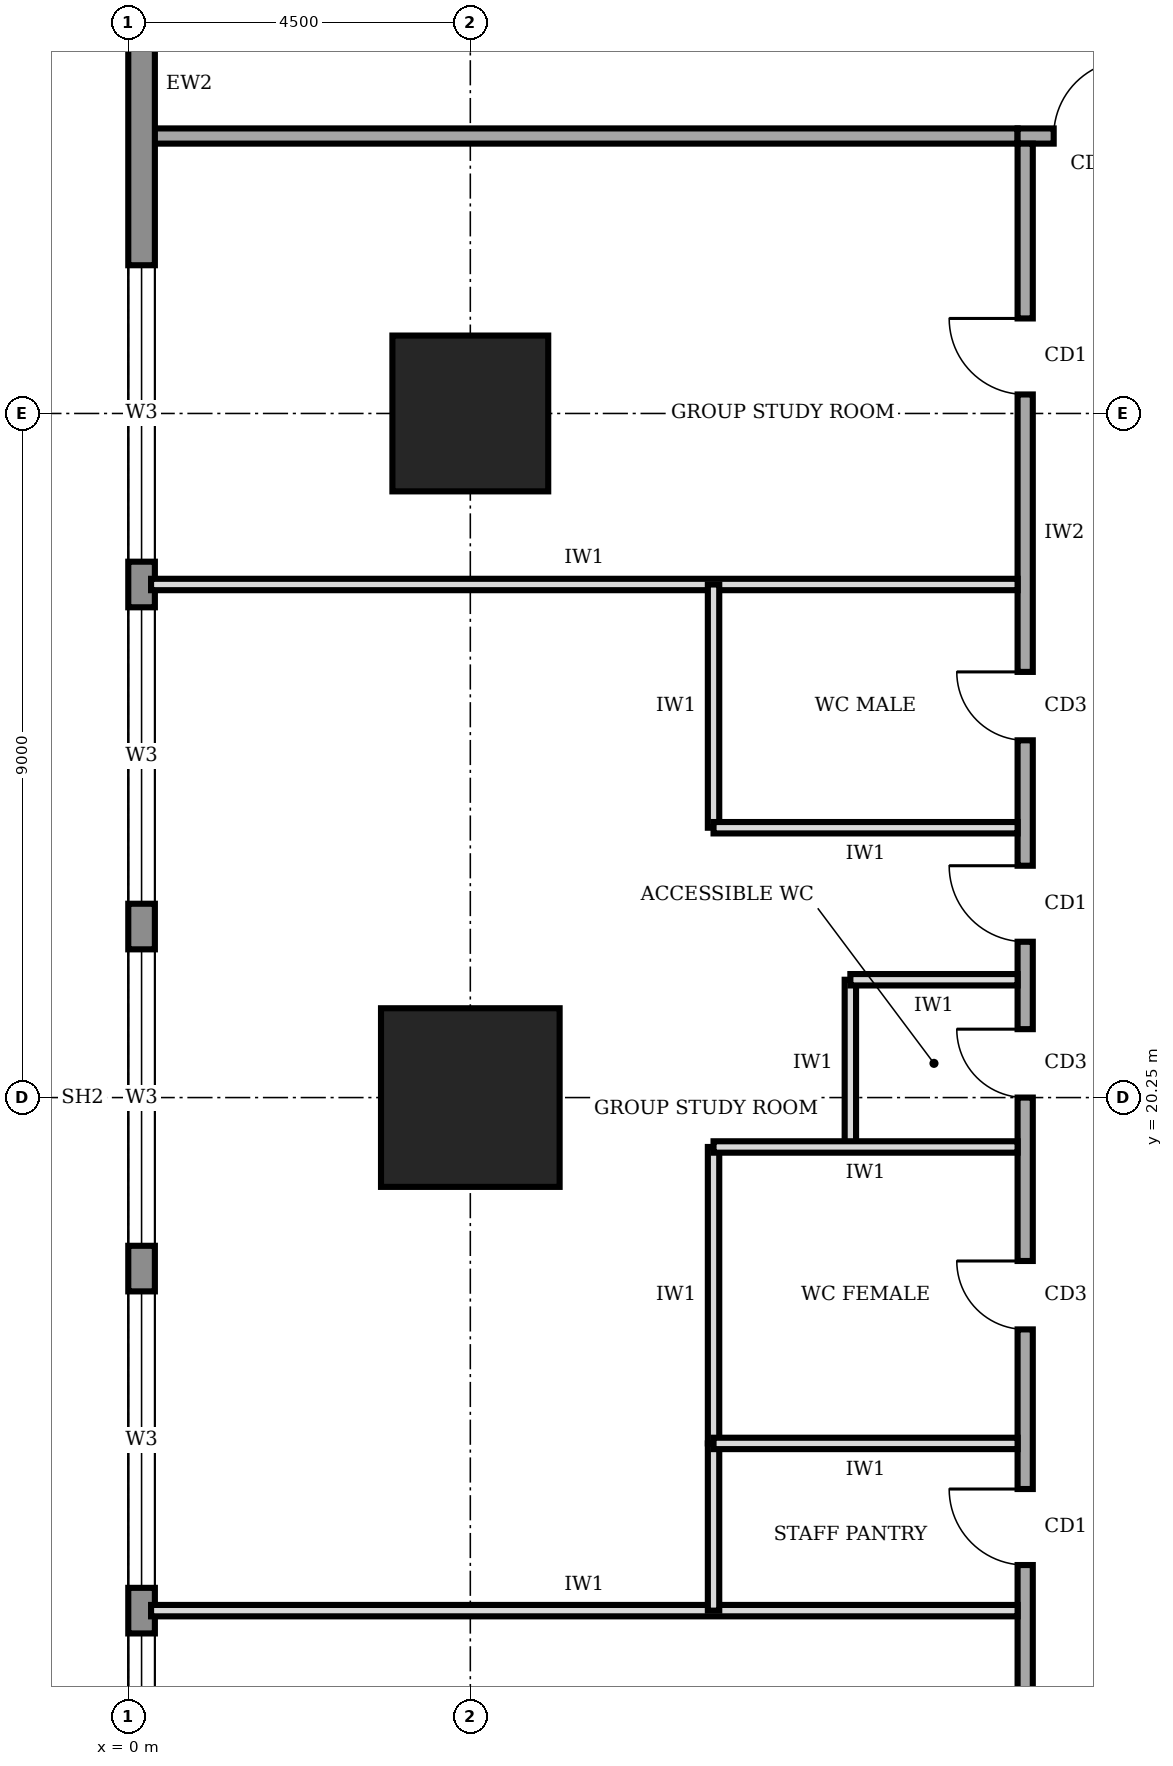
"""IFC4 building model, lengths in metres.
Left out: names, types, materials, properties, quantities, classifications, styles, units other than length and angle.
Written with IfcOpenShell. Run it as: python <this file> out.ifc"""

import sys

from ifc_helpers import new_model, si_unit, direction, frame, frame_2d, origin, origin_2d, place, context, subcontext, project, spatial, rectangle, extrude, element, fill, save


model = new_model("IFC4")
c1 = context("Model", 3, precision=1e-05, world=origin(), true_north=direction((0.0, 1.0)))
c2 = subcontext(c1, "Body", "Model", "MODEL_VIEW")
j1 = project(units=[si_unit("LENGTHUNIT", "METRE"), si_unit("PLANEANGLEUNIT", "RADIAN")], contexts=[c1])
p1 = place(None, origin())
s1 = spatial("IfcSite", under=j1, at=p1, CompositionType="ELEMENT")
p2 = place(p1, origin())
s2 = spatial("IfcBuilding", under=s1, at=p2, CompositionType="ELEMENT")
p3 = place(p2, frame((0.0, 0.0, 197.0)))
s3 = spatial("IfcBuildingStorey", under=s2, at=p3, CompositionType="ELEMENT", Elevation=197.0)
p4 = place(p3, frame((4.5, 20.25, 0.0), z_axis=(0.0, 0.0, 1.0), x_axis=(1.0, 0.0, 0.0)))
e1 = element("IfcColumn", 1, at=p4, inside=s3, PredefinedType="COLUMN", context=c2, shape_type="SweptSolid", body=[
    extrude(rectangle(XDim=2.35, YDim=2.35, at=origin_2d()), origin(), (0.0, 0.0, 1.0), 4.0),
])
p5 = place(p3, frame((4.5, 29.25, 0.0), z_axis=(0.0, 0.0, 1.0), x_axis=(1.0, 0.0, 0.0)))
e2 = element("IfcColumn", 2, at=p5, inside=s3, PredefinedType="COLUMN", context=c2, shape_type="SweptSolid", body=[
    extrude(rectangle(XDim=2.05, YDim=2.05, at=origin_2d()), origin(), (0.0, 0.0, 1.0), 4.0),
])
p6 = place(p3, frame((0.175, 35.98, 0.0), z_axis=(0.0, 0.0, 1.0), x_axis=(0.0, -1.0, 0.0)))
e3 = element("IfcWall", 3, at=p6, inside=s3, PredefinedType="STANDARD", context=c2, shape_type="SweptSolid", body=[
    extrude(rectangle(XDim=31.46, YDim=0.35, at=frame_2d((15.73, 0.0))), origin(), (0.0, 0.0, 1.0), 3.75),
])
p7 = place(p6, frame((27.21, 0.0, 0.95)))
e4 = element("IfcOpeningElement", 4, at=p7, cuts=e3, PredefinedType="OPENING", context=c2, shape_type="SweptSolid", body=[
    extrude(rectangle(XDim=3.9, YDim=1.8, at=frame_2d((1.95, 0.9))), frame((0.0, 0.185, 0.0), z_axis=(0.0, -1.0, 0.0), x_axis=(1.0, 0.0, 0.0)), (0.0, 0.0, 1.0), 0.37),
])
p8 = place(p6, frame((22.78, 0.0, 0.95)))
e5 = element("IfcOpeningElement", 5, at=p8, cuts=e3, PredefinedType="OPENING", context=c2, shape_type="SweptSolid", body=[
    extrude(rectangle(XDim=3.9, YDim=1.8, at=frame_2d((1.95, 0.9))), frame((0.0, 0.185, 0.0), z_axis=(0.0, -1.0, 0.0), x_axis=(1.0, 0.0, 0.0)), (0.0, 0.0, 1.0), 0.37),
])
p9 = place(p6, frame((18.28, 0.0, 0.95)))
e6 = element("IfcOpeningElement", 6, at=p9, cuts=e3, PredefinedType="OPENING", context=c2, shape_type="SweptSolid", body=[
    extrude(rectangle(XDim=3.9, YDim=1.8, at=frame_2d((1.95, 0.9))), frame((0.0, 0.185, 0.0), z_axis=(0.0, -1.0, 0.0), x_axis=(1.0, 0.0, 0.0)), (0.0, 0.0, 1.0), 0.37),
])
p10 = place(p6, frame((13.78, 0.0, 0.95)))
e7 = element("IfcOpeningElement", 7, at=p10, cuts=e3, PredefinedType="OPENING", context=c2, shape_type="SweptSolid", body=[
    extrude(rectangle(XDim=3.9, YDim=1.8, at=frame_2d((1.95, 0.9))), frame((0.0, 0.185, 0.0), z_axis=(0.0, -1.0, 0.0), x_axis=(1.0, 0.0, 0.0)), (0.0, 0.0, 1.0), 0.37),
])
p11 = place(p6, frame((9.28, 0.0, 0.95)))
e8 = element("IfcOpeningElement", 8, at=p11, cuts=e3, PredefinedType="OPENING", context=c2, shape_type="SweptSolid", body=[
    extrude(rectangle(XDim=3.9, YDim=1.8, at=frame_2d((1.95, 0.9))), frame((0.0, 0.185, 0.0), z_axis=(0.0, -1.0, 0.0), x_axis=(1.0, 0.0, 0.0)), (0.0, 0.0, 1.0), 0.37),
])
p12 = place(p6, frame((4.78, 0.0, 0.95)))
e9 = element("IfcOpeningElement", 9, at=p12, cuts=e3, PredefinedType="OPENING", context=c2, shape_type="SweptSolid", body=[
    extrude(rectangle(XDim=3.9, YDim=1.8, at=frame_2d((1.95, 0.9))), frame((0.0, 0.185, 0.0), z_axis=(0.0, -1.0, 0.0), x_axis=(1.0, 0.0, 0.0)), (0.0, 0.0, 1.0), 0.37),
])
p13 = place(p3, frame((28.6, 32.9, 0.0), z_axis=(0.0, 0.0, 1.0), x_axis=(-1.0, 0.0, 0.0)))
e10 = element("IfcWall", 10, at=p13, inside=s3, PredefinedType="SOLIDWALL", context=c2, shape_type="SweptSolid", body=[
    extrude(rectangle(XDim=16.9, YDim=0.2, at=frame_2d((8.45, 0.0))), origin(), (0.0, 0.0, 1.0), 3.75),
])
p14 = place(p13, frame((15.425, 0.0, 0.0)))
e11 = element("IfcOpeningElement", 11, at=p14, cuts=e10, PredefinedType="OPENING", context=c2, shape_type="SweptSolid", body=[
    extrude(rectangle(XDim=1.0, YDim=2.1, at=frame_2d((0.5, 1.05))), frame((0.0, 0.11, 0.0), z_axis=(0.0, -1.0, 0.0), x_axis=(1.0, 0.0, 0.0)), (0.0, 0.0, 1.0), 0.22),
])
p15 = place(p13, frame((12.35, 0.0, 0.0)))
e12 = element("IfcOpeningElement", 12, at=p15, cuts=e10, PredefinedType="OPENING", context=c2, shape_type="SweptSolid", body=[
    extrude(rectangle(XDim=1.0, YDim=2.1, at=frame_2d((0.5, 1.05))), frame((0.0, 0.11, 0.0), z_axis=(0.0, -1.0, 0.0), x_axis=(1.0, 0.0, 0.0)), (0.0, 0.0, 1.0), 0.22),
])
p16 = place(p13, frame((5.6, 0.0, 0.0)))
e13 = element("IfcOpeningElement", 13, at=p16, cuts=e10, PredefinedType="OPENING", context=c2, shape_type="SweptSolid", body=[
    extrude(rectangle(XDim=1.0, YDim=2.1, at=frame_2d((0.5, 1.05))), frame((0.0, 0.11, 0.0), z_axis=(0.0, -1.0, 0.0), x_axis=(1.0, 0.0, 0.0)), (0.0, 0.0, 1.0), 0.22),
])
p17 = place(p13, frame((0.275, 0.0, 0.0)))
e14 = element("IfcOpeningElement", 14, at=p17, cuts=e10, PredefinedType="OPENING", context=c2, shape_type="SweptSolid", body=[
    extrude(rectangle(XDim=1.0, YDim=2.1, at=frame_2d((0.5, 1.05))), frame((0.0, 0.11, 0.0), z_axis=(0.0, -1.0, 0.0), x_axis=(1.0, 0.0, 0.0)), (0.0, 0.0, 1.0), 0.22),
])
p18 = place(p3, frame((11.8, 32.8, 0.0), z_axis=(0.0, 0.0, 1.0), x_axis=(0.0, -1.0, 0.0)))
e15 = element("IfcWall", 15, at=p18, inside=s3, PredefinedType="SOLIDWALL", context=c2, shape_type="SweptSolid", body=[
    extrude(rectangle(XDim=25.3, YDim=0.2, at=frame_2d((12.65, 0.0))), origin(), (0.0, 0.0, 1.0), 3.75),
])
p19 = place(p18, frame((21.8, 0.0, 0.0)))
e16 = element("IfcOpeningElement", 16, at=p19, cuts=e15, PredefinedType="OPENING", context=c2, shape_type="SweptSolid", body=[
    extrude(rectangle(XDim=1.0, YDim=2.1, at=frame_2d((0.5, 1.05))), frame((0.0, 0.11, 0.0), z_axis=(0.0, -1.0, 0.0), x_axis=(1.0, 0.0, 0.0)), (0.0, 0.0, 1.0), 0.22),
])
p20 = place(p18, frame((17.7, 0.0, 0.0)))
e17 = element("IfcOpeningElement", 17, at=p20, cuts=e15, PredefinedType="OPENING", context=c2, shape_type="SweptSolid", body=[
    extrude(rectangle(XDim=1.0, YDim=2.1, at=frame_2d((0.5, 1.05))), frame((0.0, 0.11, 0.0), z_axis=(0.0, -1.0, 0.0), x_axis=(1.0, 0.0, 0.0)), (0.0, 0.0, 1.0), 0.22),
])
p21 = place(p18, frame((14.7, 0.0, 0.0)))
e18 = element("IfcOpeningElement", 18, at=p21, cuts=e15, PredefinedType="OPENING", context=c2, shape_type="SweptSolid", body=[
    extrude(rectangle(XDim=0.9, YDim=2.1, at=frame_2d((0.45, 1.05))), frame((0.0, 0.11, 0.0), z_axis=(0.0, -1.0, 0.0), x_axis=(1.0, 0.0, 0.0)), (0.0, 0.0, 1.0), 0.22),
])
p22 = place(p18, frame((11.65, 0.0, 0.0)))
e19 = element("IfcOpeningElement", 19, at=p22, cuts=e15, PredefinedType="OPENING", context=c2, shape_type="SweptSolid", body=[
    extrude(rectangle(XDim=0.9, YDim=2.1, at=frame_2d((0.45, 1.05))), frame((0.0, 0.11, 0.0), z_axis=(0.0, -1.0, 0.0), x_axis=(1.0, 0.0, 0.0)), (0.0, 0.0, 1.0), 0.22),
])
p23 = place(p18, frame((6.95, 0.0, 0.0)))
e20 = element("IfcOpeningElement", 20, at=p23, cuts=e15, PredefinedType="OPENING", context=c2, shape_type="SweptSolid", body=[
    extrude(rectangle(XDim=0.9, YDim=2.1, at=frame_2d((0.45, 1.05))), frame((0.0, 0.11, 0.0), z_axis=(0.0, -1.0, 0.0), x_axis=(1.0, 0.0, 0.0)), (0.0, 0.0, 1.0), 0.22),
])
p24 = place(p18, frame((9.5, 0.0, 0.0)))
e21 = element("IfcOpeningElement", 21, at=p24, cuts=e15, PredefinedType="OPENING", context=c2, shape_type="SweptSolid", body=[
    extrude(rectangle(XDim=1.0, YDim=2.1, at=frame_2d((0.5, 1.05))), frame((0.0, 0.11, 0.0), z_axis=(0.0, -1.0, 0.0), x_axis=(1.0, 0.0, 0.0)), (0.0, 0.0, 1.0), 0.22),
])
p25 = place(p18, frame((2.3, 0.0, 0.0)))
e22 = element("IfcOpeningElement", 22, at=p25, cuts=e15, PredefinedType="OPENING", context=c2, shape_type="SweptSolid", body=[
    extrude(rectangle(XDim=1.0, YDim=2.1, at=frame_2d((0.5, 1.05))), frame((0.0, 0.11, 0.0), z_axis=(0.0, -1.0, 0.0), x_axis=(1.0, 0.0, 0.0)), (0.0, 0.0, 1.0), 0.22),
])
p26 = place(p3, frame((0.3, 32.9, 0.0), z_axis=(0.0, 0.0, 1.0), x_axis=(1.0, 0.0, 0.0)))
e23 = element("IfcWall", 23, at=p26, inside=s3, PredefinedType="SOLIDWALL", context=c2, shape_type="SweptSolid", body=[
    extrude(rectangle(XDim=11.4, YDim=0.2, at=frame_2d((5.7, 0.0))), origin(), (0.0, 0.0, 1.0), 3.75),
])
for number, where, z_axis, x_axis in (
    (24, (0.3, 13.5, 0.0), (0.0, 0.0, 1.0), (1.0, 0.0, 0.0)),
    (25, (0.3, 27.0, 0.0), (0.0, 0.0, 1.0), (1.0, 0.0, 0.0)),
):
    element("IfcWall", number, at=place(p3, frame(where, z_axis=z_axis, x_axis=x_axis)), inside=s3, PredefinedType="PARTITIONING", context=c2, shape_type="SweptSolid", body=[
        extrude(rectangle(XDim=11.4, YDim=0.15, at=frame_2d((5.7, 0.0))), origin(), (0.0, 0.0, 1.0), 3.75),
    ])
p27 = place(p3, frame((11.7, 15.7, 0.0), z_axis=(0.0, 0.0, 1.0), x_axis=(-1.0, 0.0, 0.0)))
e26 = element("IfcWall", 26, at=p27, inside=s3, PredefinedType="PARTITIONING", context=c2, shape_type="SweptSolid", body=[
    extrude(rectangle(XDim=4.0, YDim=0.15, at=frame_2d((2.0, 0.0))), origin(), (0.0, 0.0, 1.0), 3.75),
])
p28 = place(p3, frame((11.7, 19.6, 0.0), z_axis=(0.0, 0.0, 1.0), x_axis=(-1.0, 0.0, 0.0)))
e27 = element("IfcWall", 27, at=p28, inside=s3, PredefinedType="PARTITIONING", context=c2, shape_type="SweptSolid", body=[
    extrude(rectangle(XDim=4.0, YDim=0.15, at=frame_2d((2.0, 0.0))), origin(), (0.0, 0.0, 1.0), 2.85),
])
p29 = place(p3, frame((11.7, 21.8, 0.0), z_axis=(0.0, 0.0, 1.0), x_axis=(-1.0, 0.0, 0.0)))
e28 = element("IfcWall", 28, at=p29, inside=s3, PredefinedType="PARTITIONING", context=c2, shape_type="SweptSolid", body=[
    extrude(rectangle(XDim=2.2, YDim=0.15, at=frame_2d((1.1, 0.0))), origin(), (0.0, 0.0, 1.0), 3.75),
])
p30 = place(p3, frame((11.7, 23.8, 0.0), z_axis=(0.0, 0.0, 1.0), x_axis=(-1.0, 0.0, 0.0)))
e29 = element("IfcWall", 29, at=p30, inside=s3, PredefinedType="PARTITIONING", context=c2, shape_type="SweptSolid", body=[
    extrude(rectangle(XDim=4.0, YDim=0.15, at=frame_2d((2.0, 0.0))), origin(), (0.0, 0.0, 1.0), 3.75),
])
p31 = place(p3, frame((7.7, 13.5, 0.0), z_axis=(0.0, 0.0, 1.0), x_axis=(0.0, 1.0, 0.0)))
e30 = element("IfcWall", 30, at=p31, inside=s3, PredefinedType="PARTITIONING", context=c2, shape_type="SweptSolid", body=[
    extrude(rectangle(XDim=2.2, YDim=0.15, at=frame_2d((1.1, 0.0))), origin(), (0.0, 0.0, 1.0), 3.75),
])
p32 = place(p3, frame((7.7, 15.7, 0.0), z_axis=(0.0, 0.0, 1.0), x_axis=(0.0, 1.0, 0.0)))
e31 = element("IfcWall", 31, at=p32, inside=s3, PredefinedType="PARTITIONING", context=c2, shape_type="SweptSolid", body=[
    extrude(rectangle(XDim=3.9, YDim=0.15, at=frame_2d((1.95, 0.0))), origin(), (0.0, 0.0, 1.0), 3.75),
])
p33 = place(p3, frame((9.5, 19.6, 0.0), z_axis=(0.0, 0.0, 1.0), x_axis=(0.0, 1.0, 0.0)))
e32 = element("IfcWall", 32, at=p33, inside=s3, PredefinedType="PARTITIONING", context=c2, shape_type="SweptSolid", body=[
    extrude(rectangle(XDim=2.2, YDim=0.15, at=frame_2d((1.1, 0.0))), origin(), (0.0, 0.0, 1.0), 3.75),
])
p34 = place(p3, frame((7.7, 23.8, 0.0), z_axis=(0.0, 0.0, 1.0), x_axis=(0.0, 1.0, 0.0)))
e33 = element("IfcWall", 33, at=p34, inside=s3, PredefinedType="PARTITIONING", context=c2, shape_type="SweptSolid", body=[
    extrude(rectangle(XDim=3.2, YDim=0.15, at=frame_2d((1.6, 0.0))), origin(), (0.0, 0.0, 1.0), 3.75),
])
p35 = place(p8, origin())
e34 = element("IfcWindow", 34, at=p35, inside=s3, PartitioningType="SINGLE_PANEL", PredefinedType="WINDOW", context=c2, shape_type="SweptSolid", body=[
    extrude(rectangle(XDim=3.9, YDim=1.8, at=frame_2d((1.95, 0.9))), frame((0.0, 0.03, 0.0), z_axis=(0.0, -1.0, 0.0), x_axis=(1.0, 0.0, 0.0)), (0.0, 0.0, 1.0), 0.06),
])
fill(e5, e34)
p36 = place(p9, origin())
e35 = element("IfcWindow", 35, at=p36, inside=s3, PartitioningType="SINGLE_PANEL", PredefinedType="WINDOW", context=c2, shape_type="SweptSolid", body=[
    extrude(rectangle(XDim=3.9, YDim=1.8, at=frame_2d((1.95, 0.9))), frame((0.0, 0.03, 0.0), z_axis=(0.0, -1.0, 0.0), x_axis=(1.0, 0.0, 0.0)), (0.0, 0.0, 1.0), 0.06),
])
fill(e6, e35)
p37 = place(p10, origin())
e36 = element("IfcWindow", 36, at=p37, inside=s3, PartitioningType="SINGLE_PANEL", PredefinedType="WINDOW", context=c2, shape_type="SweptSolid", body=[
    extrude(rectangle(XDim=3.9, YDim=1.8, at=frame_2d((1.95, 0.9))), frame((0.0, 0.03, 0.0), z_axis=(0.0, -1.0, 0.0), x_axis=(1.0, 0.0, 0.0)), (0.0, 0.0, 1.0), 0.06),
])
fill(e7, e36)
p38 = place(p11, origin())
e37 = element("IfcWindow", 37, at=p38, inside=s3, PartitioningType="SINGLE_PANEL", PredefinedType="WINDOW", context=c2, shape_type="SweptSolid", body=[
    extrude(rectangle(XDim=3.9, YDim=1.8, at=frame_2d((1.95, 0.9))), frame((0.0, 0.03, 0.0), z_axis=(0.0, -1.0, 0.0), x_axis=(1.0, 0.0, 0.0)), (0.0, 0.0, 1.0), 0.06),
])
fill(e8, e37)
p39 = place(p12, origin())
e38 = element("IfcWindow", 38, at=p39, inside=s3, PartitioningType="SINGLE_PANEL", PredefinedType="WINDOW", context=c2, shape_type="SweptSolid", body=[
    extrude(rectangle(XDim=3.9, YDim=1.8, at=frame_2d((1.95, 0.9))), frame((0.0, 0.03, 0.0), z_axis=(0.0, -1.0, 0.0), x_axis=(1.0, 0.0, 0.0)), (0.0, 0.0, 1.0), 0.06),
])
fill(e9, e38)
p40 = place(p14, frame((1.0, 0.0, 0.0), z_axis=(0.0, 0.0, 1.0), x_axis=(-1.0, 0.0, 0.0)))
e39 = element("IfcDoor", 39, at=p40, inside=s3, OperationType="SINGLE_SWING_RIGHT", PredefinedType="DOOR", context=c2, shape_type="SweptSolid", body=[
    extrude(rectangle(XDim=1.0, YDim=2.1, at=frame_2d((0.5, 1.05))), frame((0.0, 0.025, 0.0), z_axis=(0.0, -1.0, 0.0), x_axis=(1.0, 0.0, 0.0)), (0.0, 0.0, 1.0), 0.05),
])
fill(e11, e39)
p41 = place(p20, frame((1.0, 0.0, 0.0), z_axis=(0.0, 0.0, 1.0), x_axis=(-1.0, 0.0, 0.0)))
e40 = element("IfcDoor", 40, at=p41, inside=s3, OperationType="SINGLE_SWING_RIGHT", PredefinedType="DOOR", context=c2, shape_type="SweptSolid", body=[
    extrude(rectangle(XDim=1.0, YDim=2.1, at=frame_2d((0.5, 1.05))), frame((0.0, 0.025, 0.0), z_axis=(0.0, -1.0, 0.0), x_axis=(1.0, 0.0, 0.0)), (0.0, 0.0, 1.0), 0.05),
])
fill(e17, e40)
p42 = place(p21, frame((0.9, 0.0, 0.0), z_axis=(0.0, 0.0, 1.0), x_axis=(-1.0, 0.0, 0.0)))
e41 = element("IfcDoor", 41, at=p42, inside=s3, OperationType="SINGLE_SWING_RIGHT", PredefinedType="DOOR", context=c2, shape_type="SweptSolid", body=[
    extrude(rectangle(XDim=0.9, YDim=2.1, at=frame_2d((0.45, 1.05))), frame((0.0, 0.025, 0.0), z_axis=(0.0, -1.0, 0.0), x_axis=(1.0, 0.0, 0.0)), (0.0, 0.0, 1.0), 0.05),
])
fill(e18, e41)
p43 = place(p22, frame((0.9, 0.0, 0.0), z_axis=(0.0, 0.0, 1.0), x_axis=(-1.0, 0.0, 0.0)))
e42 = element("IfcDoor", 42, at=p43, inside=s3, OperationType="SINGLE_SWING_RIGHT", PredefinedType="DOOR", context=c2, shape_type="SweptSolid", body=[
    extrude(rectangle(XDim=0.9, YDim=2.1, at=frame_2d((0.45, 1.05))), frame((0.0, 0.025, 0.0), z_axis=(0.0, -1.0, 0.0), x_axis=(1.0, 0.0, 0.0)), (0.0, 0.0, 1.0), 0.05),
])
fill(e19, e42)
p44 = place(p23, frame((0.9, 0.0, 0.0), z_axis=(0.0, 0.0, 1.0), x_axis=(-1.0, 0.0, 0.0)))
e43 = element("IfcDoor", 43, at=p44, inside=s3, OperationType="SINGLE_SWING_RIGHT", PredefinedType="DOOR", context=c2, shape_type="SweptSolid", body=[
    extrude(rectangle(XDim=0.9, YDim=2.1, at=frame_2d((0.45, 1.05))), frame((0.0, 0.025, 0.0), z_axis=(0.0, -1.0, 0.0), x_axis=(1.0, 0.0, 0.0)), (0.0, 0.0, 1.0), 0.05),
])
fill(e20, e43)
p45 = place(p24, frame((1.0, 0.0, 0.0), z_axis=(0.0, 0.0, 1.0), x_axis=(-1.0, 0.0, 0.0)))
e44 = element("IfcDoor", 44, at=p45, inside=s3, OperationType="SINGLE_SWING_RIGHT", PredefinedType="DOOR", context=c2, shape_type="SweptSolid", body=[
    extrude(rectangle(XDim=1.0, YDim=2.1, at=frame_2d((0.5, 1.05))), frame((0.0, 0.025, 0.0), z_axis=(0.0, -1.0, 0.0), x_axis=(1.0, 0.0, 0.0)), (0.0, 0.0, 1.0), 0.05),
])
fill(e21, e44)
p46 = place(p25, frame((1.0, 0.0, 0.0), z_axis=(0.0, 0.0, 1.0), x_axis=(-1.0, 0.0, 0.0)))
e45 = element("IfcDoor", 45, at=p46, inside=s3, OperationType="SINGLE_SWING_RIGHT", PredefinedType="DOOR", context=c2, shape_type="SweptSolid", body=[
    extrude(rectangle(XDim=1.0, YDim=2.1, at=frame_2d((0.5, 1.05))), frame((0.0, 0.025, 0.0), z_axis=(0.0, -1.0, 0.0), x_axis=(1.0, 0.0, 0.0)), (0.0, 0.0, 1.0), 0.05),
])
fill(e22, e45)
save(model, sys.argv[1])
